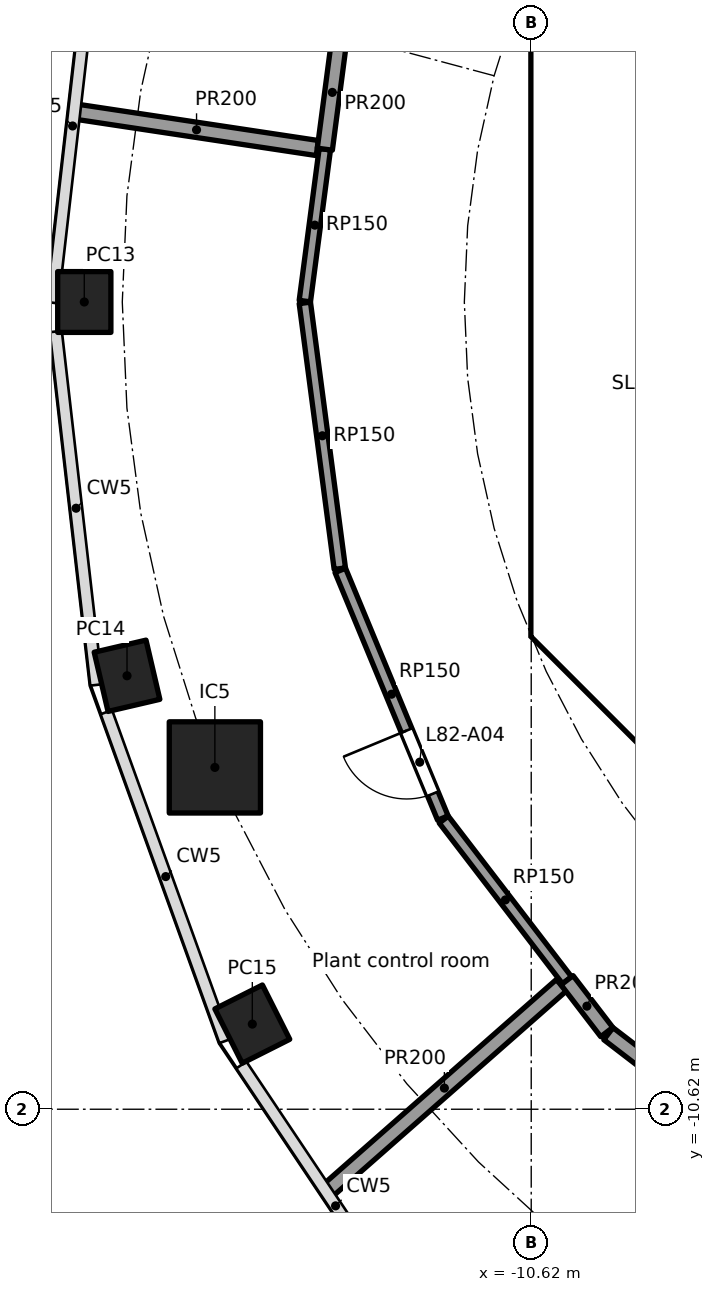
"""IFC4 building model, lengths in metres.
Left out: names, types, materials, properties, quantities, classifications, styles, units other than length and angle.
Written with IfcOpenShell. Run it as: python <this file> out.ifc"""

import sys

from ifc_helpers import new_model, si_unit, direction, frame, frame_2d, origin, origin_2d, place, context, subcontext, project, spatial, polyline, rectangle, hollow_rectangle, outline, extrude, element, fill, save


model = new_model("IFC4")
c1 = context("Model", 3, precision=1e-05, world=origin(), true_north=direction((0.0, 1.0)))
c2 = subcontext(c1, "Body", "Model", "MODEL_VIEW")
j1 = project(units=[si_unit("LENGTHUNIT", "METRE"), si_unit("PLANEANGLEUNIT", "RADIAN")], contexts=[c1])
p1 = place(None, origin())
s1 = spatial("IfcSite", under=j1, at=p1, CompositionType="ELEMENT")
p2 = place(p1, origin())
s2 = spatial("IfcBuilding", under=s1, at=p2, CompositionType="ELEMENT")
p3 = place(p2, frame((0.0, 0.0, 332.9)))
s3 = spatial("IfcBuildingStorey", under=s2, at=p3, CompositionType="ELEMENT", Elevation=332.9)
for number, where, z_axis, x_axis in (
    (1, (-16.5, 0.0, 0.0), (0.0, 0.0, 1.0), (0.0, -1.0, 0.0)),
    (2, (-15.938, -4.917, 0.0), (0.0, 0.0, 1.0), (0.227, -0.974, 0.0)),
    (3, (-14.289, -9.5, 0.0), (0.0, 0.0, 1.0), (0.45, -0.893, 0.0)),
):
    element("IfcColumn", number, at=place(p3, frame(where, z_axis=z_axis, x_axis=x_axis)), inside=s3, PredefinedType="COLUMN", context=c2, shape_type="SweptSolid", body=[
        extrude(hollow_rectangle(XDim=0.8, YDim=0.7, WallThickness=0.025, at=origin_2d()), origin(), (0.0, 0.0, 1.0), 4.0),
    ])
p4 = place(p3, frame((-14.782, -6.123, 0.0), z_axis=(0.0, 0.0, 1.0), x_axis=(1.0, 0.0, 0.0)))
e4 = element("IfcColumn", 4, at=p4, inside=s3, PredefinedType="COLUMN", context=c2, shape_type="SweptSolid", body=[
    extrude(rectangle(XDim=1.2, YDim=1.2, at=origin_2d()), origin(), (0.0, 0.0, 1.0), 4.0),
])
p5 = place(p3, frame((-10.325, 3.801, 0.0), z_axis=(0.0, 0.0, 1.0), x_axis=(0.0, -1.0, 0.0)))
e5 = element("IfcWall", 5, at=p5, inside=s3, PredefinedType="SHEAR", context=c2, shape_type="SweptSolid", body=[
    extrude(rectangle(XDim=7.602, YDim=0.6, at=frame_2d((3.801, 0.0))), origin(), (0.0, 0.0, 1.0), 3.7),
])
p6 = place(p5, frame((0.651, 0.0, 0.0)))
e6 = element("IfcOpeningElement", 6, at=p6, cuts=e5, PredefinedType="OPENING", context=c2, shape_type="SweptSolid", body=[
    extrude(rectangle(XDim=1.5, YDim=2.1, at=frame_2d((0.75, 1.05))), frame((0.0, 0.31, 0.0), z_axis=(0.0, -1.0, 0.0), x_axis=(1.0, 0.0, 0.0)), (0.0, 0.0, 1.0), 0.62),
])
p7 = place(p5, frame((5.451, 0.0, 0.0)))
e7 = element("IfcOpeningElement", 7, at=p7, cuts=e5, PredefinedType="OPENING", context=c2, shape_type="SweptSolid", body=[
    extrude(rectangle(XDim=1.5, YDim=2.1, at=frame_2d((0.75, 1.05))), frame((0.0, 0.31, 0.0), z_axis=(0.0, -1.0, 0.0), x_axis=(1.0, 0.0, 0.0)), (0.0, 0.0, 1.0), 0.62),
])
p8 = place(p3, frame((-9.988, -4.613, 0.0), z_axis=(0.0, 0.0, 1.0), x_axis=(0.707106781187, -0.707106781187, 0.0)))
e8 = element("IfcWall", 8, at=p8, inside=s3, PredefinedType="SHEAR", context=c2, shape_type="SweptSolid", body=[
    extrude(rectangle(XDim=7.602, YDim=0.6, at=frame_2d((3.801, 0.0))), origin(), (0.0, 0.0, 1.0), 3.7),
])
p9 = place(p8, frame((6.151, 0.0, 0.0)))
e9 = element("IfcOpeningElement", 9, at=p9, cuts=e8, PredefinedType="OPENING", context=c2, shape_type="SweptSolid", body=[
    extrude(rectangle(XDim=1.1, YDim=2.1, at=frame_2d((0.55, 1.05))), frame((0.0, 0.31, 0.0), z_axis=(0.0, -1.0, 0.0), x_axis=(1.0, 0.0, 0.0)), (0.0, 0.0, 1.0), 0.62),
])
p10 = place(p3, origin())
e10 = element("IfcWall", 10, at=p10, inside=s3, PredefinedType="SHEAR", context=c2, shape_type="SweptSolid", body=[
    extrude(outline(polyline([(-10.625, -3.801), (-10.025, -3.801), (-10.025, -4.152), (-9.776, -4.401), (-10.2, -4.825), (-10.625, -4.401), (-10.625, -3.801)])), origin(), (0.0, 0.0, 1.0), 3.7),
])
p11 = place(p3, frame((-10.025, -4.0, 0.0), z_axis=(0.0, 0.0, 1.0), x_axis=(1.0, 0.0, 0.0)))
e11 = element("IfcWall", 11, at=p11, inside=s3, PredefinedType="PARTITIONING", context=c2, shape_type="SweptSolid", body=[
    extrude(rectangle(XDim=3.325, YDim=0.2, at=frame_2d((1.662, 0.0))), origin(), (0.0, 0.0, 1.0), 3.7),
])
p12 = place(p3, frame((-13.598, 0.012, 0.0), z_axis=(0.0, 0.0, 1.0), x_axis=(0.130545357325, 0.991442338051, 0.0)))
e12 = element("IfcWall", 12, at=p12, inside=s3, PredefinedType="PARTITIONING", context=c2, shape_type="SweptSolid", body=[
    extrude(rectangle(XDim=2.016, YDim=0.15, at=frame_2d((1.008, 0.0))), origin(), (0.0, 0.0, 1.0), 3.7),
])
p13 = place(p3, frame((-13.138, -3.508, 0.0), z_axis=(0.0, 0.0, 1.0), x_axis=(-0.130499283623, 0.991448403586, 0.0)))
e13 = element("IfcWall", 13, at=p13, inside=s3, PredefinedType="PARTITIONING", context=c2, shape_type="SweptSolid", body=[
    extrude(rectangle(XDim=3.527, YDim=0.15, at=frame_2d((1.763, 0.0))), origin(), (0.0, 0.0, 1.0), 3.7),
])
p14 = place(p3, frame((-11.782, -6.789, 0.0), z_axis=(0.0, 0.0, 1.0), x_axis=(-0.382677866108, 0.923881838111, 0.0)))
e14 = element("IfcWall", 14, at=p14, inside=s3, PredefinedType="PARTITIONING", context=c2, shape_type="SweptSolid", body=[
    extrude(rectangle(XDim=3.527, YDim=0.15, at=frame_2d((1.763, 0.0))), origin(), (0.0, 0.0, 1.0), 3.7),
])
p15 = place(p14, frame((0.346, 0.0, 0.0)))
e15 = element("IfcOpeningElement", 15, at=p15, cuts=e14, PredefinedType="OPENING", context=c2, shape_type="SweptSolid", body=[
    extrude(rectangle(XDim=0.9, YDim=2.1, at=frame_2d((0.45, 1.05))), frame((0.0, 0.085, 0.0), z_axis=(0.0, -1.0, 0.0), x_axis=(1.0, 0.0, 0.0)), (0.0, 0.0, 1.0), 0.17),
])
p16 = place(p3, frame((-10.149, -8.923, 0.0), z_axis=(0.0, 0.0, 1.0), x_axis=(-0.608731606531, 0.793376222993, 0.0)))
e16 = element("IfcWall", 16, at=p16, inside=s3, PredefinedType="PARTITIONING", context=c2, shape_type="SweptSolid", body=[
    extrude(rectangle(XDim=2.664, YDim=0.15, at=frame_2d((1.332, 0.0))), origin(), (0.0, 0.0, 1.0), 3.7),
])
p17 = place(p3, frame((-16.612, 2.505, 0.0), z_axis=(0.0, 0.0, 1.0), x_axis=(0.988817905908, -0.149127961685, 0.0)))
e17 = element("IfcWall", 17, at=p17, inside=s3, PredefinedType="PARTITIONING", context=c2, shape_type="SweptSolid", body=[
    extrude(rectangle(XDim=3.214, YDim=0.2, at=frame_2d((1.607, 0.0))), origin(), (0.0, 0.0, 1.0), 3.7),
])
p18 = place(p3, frame((-13.335, 2.01, 0.0), z_axis=(0.0, 0.0, 1.0), x_axis=(0.130391662061, 0.99146256332, 0.0)))
e18 = element("IfcWall", 18, at=p18, inside=s3, PredefinedType="PARTITIONING", context=c2, shape_type="SweptSolid", body=[
    extrude(rectangle(XDim=1.507, YDim=0.2, at=frame_2d((0.754, 0.0))), origin(), (0.0, 0.0, 1.0), 3.7),
])
p19 = place(p3, frame((-10.224, -8.989, 0.0), z_axis=(0.0, 0.0, 1.0), x_axis=(-0.750994766266, -0.660308156122, 0.0)))
e19 = element("IfcWall", 19, at=p19, inside=s3, PredefinedType="PARTITIONING", context=c2, shape_type="SweptSolid", body=[
    extrude(rectangle(XDim=4.097, YDim=0.2, at=frame_2d((2.049, 0.0))), origin(), (0.0, 0.0, 1.0), 3.7),
])
p20 = place(p3, frame((-9.626, -9.605, 0.0), z_axis=(0.0, 0.0, 1.0), x_axis=(-0.608694005511, 0.793405071609, 0.0)))
e20 = element("IfcWall", 20, at=p20, inside=s3, PredefinedType="PARTITIONING", context=c2, shape_type="SweptSolid", body=[
    extrude(rectangle(XDim=0.859, YDim=0.2, at=frame_2d((0.43, 0.0))), origin(), (0.0, 0.0, 1.0), 3.7),
])
p21 = place(p3, frame((-6.812, -11.769, 0.0), z_axis=(0.0, 0.0, 1.0), x_axis=(-0.793402024283, 0.608697977542, 0.0)))
e21 = element("IfcWall", 21, at=p21, inside=s3, PredefinedType="PARTITIONING", context=c2, shape_type="SweptSolid", body=[
    extrude(rectangle(XDim=3.52, YDim=0.2, at=frame_2d((1.76, 0.0))), origin(), (0.0, 0.0, 1.0), 3.7),
])
p22 = place(p6, origin())
e22 = element("IfcDoor", 22, at=p22, inside=s3, OperationType="DOUBLE_DOOR_SINGLE_SWING", PredefinedType="DOOR", context=c2, shape_type="SweptSolid", body=[
    extrude(rectangle(XDim=1.5, YDim=2.1, at=frame_2d((0.75, 1.05))), frame((0.0, 0.025, 0.0), z_axis=(0.0, -1.0, 0.0), x_axis=(1.0, 0.0, 0.0)), (0.0, 0.0, 1.0), 0.05),
])
fill(e6, e22)
p23 = place(p7, origin())
e23 = element("IfcDoor", 23, at=p23, inside=s3, OperationType="DOUBLE_DOOR_SINGLE_SWING", PredefinedType="DOOR", context=c2, shape_type="SweptSolid", body=[
    extrude(rectangle(XDim=1.5, YDim=2.1, at=frame_2d((0.75, 1.05))), frame((0.0, 0.025, 0.0), z_axis=(0.0, -1.0, 0.0), x_axis=(1.0, 0.0, 0.0)), (0.0, 0.0, 1.0), 0.05),
])
fill(e7, e23)
p24 = place(p15, origin())
e24 = element("IfcDoor", 24, at=p24, inside=s3, OperationType="SINGLE_SWING_RIGHT", PredefinedType="DOOR", context=c2, shape_type="SweptSolid", body=[
    extrude(rectangle(XDim=0.9, YDim=2.1, at=frame_2d((0.45, 1.05))), frame((0.0, 0.025, 0.0), z_axis=(0.0, -1.0, 0.0), x_axis=(1.0, 0.0, 0.0)), (0.0, 0.0, 1.0), 0.05),
])
fill(e15, e24)
save(model, sys.argv[1])
